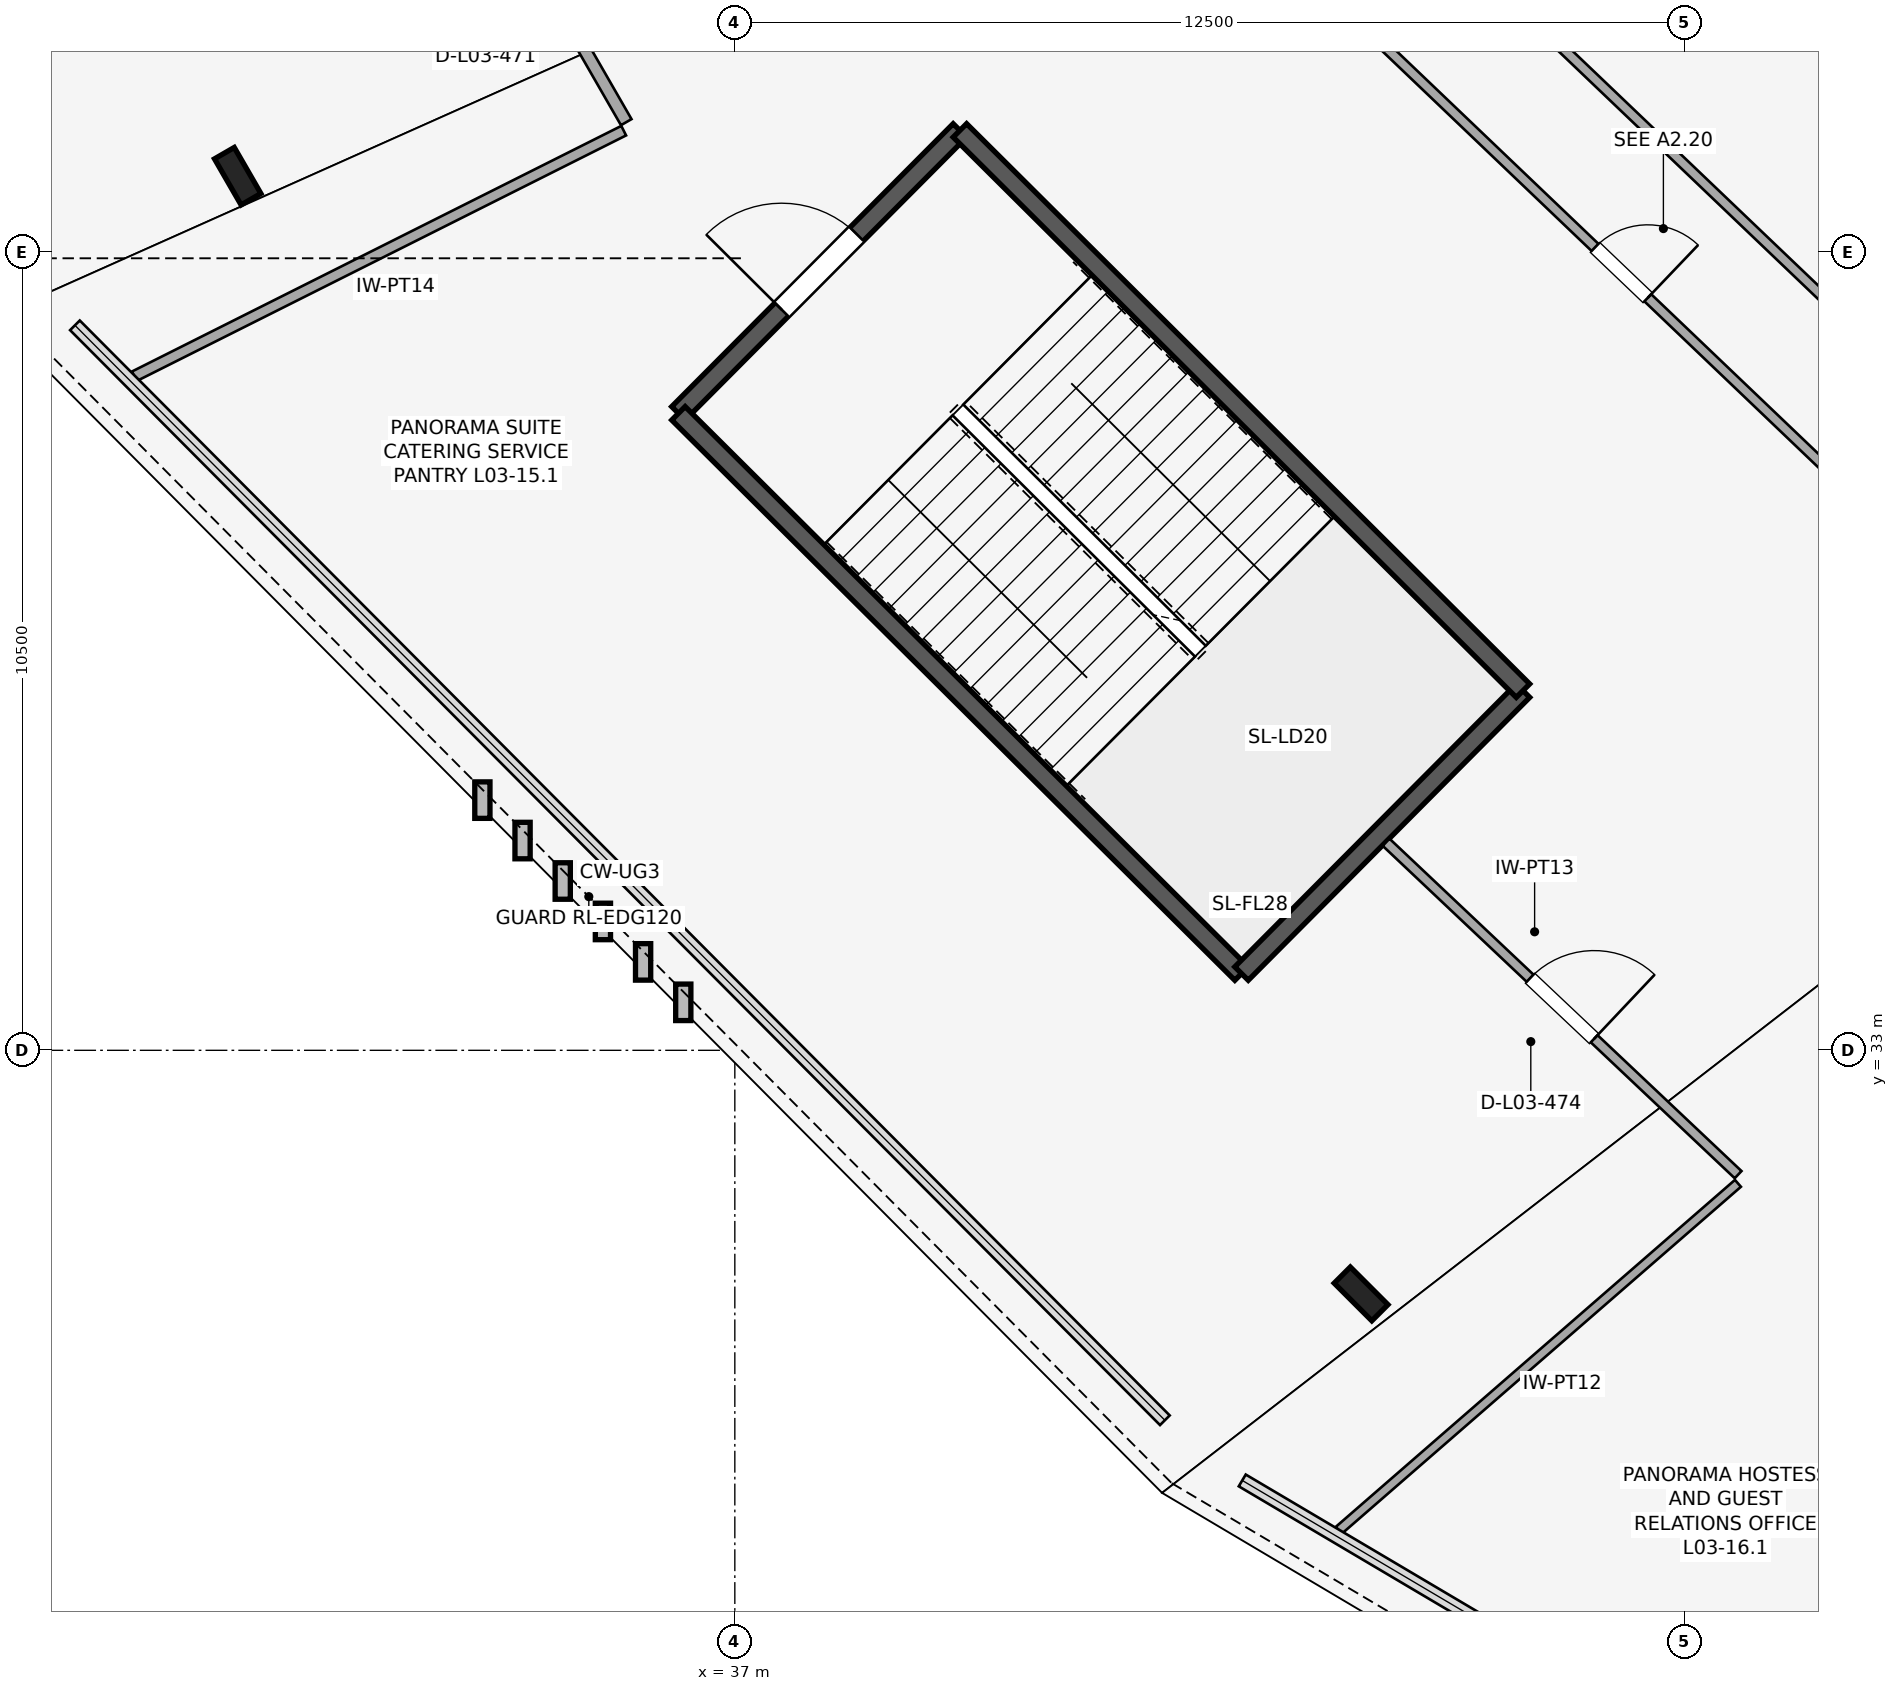
"""IFC4 building model, lengths in metres.
Left out: names, types, materials, properties, quantities, classifications, styles, units other than length and angle.
Written with IfcOpenShell. Run it as: python <this file> out.ifc"""

import sys

from ifc_helpers import new_model, si_unit, direction, frame, frame_2d, origin, origin_2d, place, context, subcontext, project, spatial, rectangle, i_section, extrude, element, fill, save


model = new_model("IFC4")
c1 = context("Model", 3, precision=1e-05, world=origin(), true_north=direction((0.0, 1.0)))
c2 = subcontext(c1, "Body", "Model", "MODEL_VIEW")
j1 = project(units=[si_unit("LENGTHUNIT", "METRE"), si_unit("PLANEANGLEUNIT", "RADIAN")], contexts=[c1])
p1 = place(None, origin())
s1 = spatial("IfcSite", under=j1, at=p1, CompositionType="ELEMENT")
p2 = place(p1, origin())
s2 = spatial("IfcBuilding", under=s1, at=p2, CompositionType="ELEMENT")
p3 = place(p2, frame((0.0, 0.0, 15.6)))
s3 = spatial("IfcBuildingStorey", under=s2, at=p3, CompositionType="ELEMENT", Elevation=15.6)
for number, where, z_axis, x_axis in (
    (1, (30.46, 44.5, 0.0), (0.0, 0.0, 1.0), (-0.866, -0.5, 0.0)),
    (2, (45.239, 29.795, 0.0), (0.0, 0.0, 1.0), (-0.707, -0.707, 0.0)),
):
    element("IfcColumn", number, at=place(p3, frame(where, z_axis=z_axis, x_axis=x_axis)), inside=s3, PredefinedType="COLUMN", context=c2, shape_type="SweptSolid", body=[
        extrude(i_section(OverallWidth=0.3, OverallDepth=0.7, WebThickness=0.017, FlangeThickness=0.032, FilletRadius=0.027, at=origin_2d()), origin(), (0.0, 0.0, 1.0), 5.2),
    ])
p4 = place(p3, frame((39.961, 45.102, 0.0), z_axis=(0.0, 0.0, 1.0), x_axis=(-0.705314141126, -0.708894888067, 0.0)))
e3 = element("IfcWall", 3, at=p4, inside=s3, PredefinedType="SHEAR", context=c2, shape_type="SweptSolid", body=[
    extrude(rectangle(XDim=5.25, YDim=0.25, at=frame_2d((2.625, 0.0))), origin(), (0.0, 0.0, 1.0), 4.9),
])
p5 = place(p4, frame((1.925, 0.0, 0.0)))
e4 = element("IfcOpeningElement", 4, at=p5, cuts=e3, PredefinedType="OPENING", context=c2, shape_type="SweptSolid", body=[
    extrude(rectangle(XDim=1.4, YDim=2.2, at=frame_2d((0.7, 1.1))), frame((0.0, 0.135, 0.0), z_axis=(0.0, -1.0, 0.0), x_axis=(1.0, 0.0, 0.0)), (0.0, 0.0, 1.0), 0.27),
])
p6 = place(p3, frame((36.258, 41.38, 0.0), z_axis=(0.0, 0.0, 1.0), x_axis=(0.708891762409, -0.705317282639, 0.0)))
e5 = element("IfcWall", 5, at=p6, inside=s3, PredefinedType="SHEAR", context=c2, shape_type="SweptSolid", body=[
    extrude(rectangle(XDim=10.45, YDim=0.25, at=frame_2d((5.225, 0.0))), origin(), (0.0, 0.0, 1.0), 4.9),
])
p7 = place(p3, frame((43.666, 34.01, 0.0), z_axis=(0.0, 0.0, 1.0), x_axis=(0.705314141126, 0.708894888067, 0.0)))
e6 = element("IfcWall", 6, at=p7, inside=s3, PredefinedType="SHEAR", context=c2, shape_type="SweptSolid", body=[
    extrude(rectangle(XDim=5.25, YDim=0.25, at=frame_2d((2.625, 0.0))), origin(), (0.0, 0.0, 1.0), 4.9),
])
p8 = place(p3, frame((47.369, 37.731, 0.0), z_axis=(0.0, 0.0, 1.0), x_axis=(-0.708891762409, 0.705317282639, 0.0)))
e7 = element("IfcWall", 7, at=p8, inside=s3, PredefinedType="SHEAR", context=c2, shape_type="SweptSolid", body=[
    extrude(rectangle(XDim=10.45, YDim=0.25, at=frame_2d((5.225, 0.0))), origin(), (0.0, 0.0, 1.0), 4.9),
])
p9 = place(p3, frame((45.543, 46.212, 0.0), z_axis=(0.0, 0.0, 1.0), x_axis=(0.723282965578, -0.69055177337, 0.0)))
e8 = element("IfcWall", 8, at=p9, inside=s3, PredefinedType="PARTITIONING", context=c2, shape_type="SweptSolid", body=[
    extrude(rectangle(XDim=8.63, YDim=0.13, at=frame_2d((4.315, 0.0))), origin(), (0.0, 0.0, 1.0), 2.45),
])
p10 = place(p9, frame((3.835, 0.0, 0.0)))
e9 = element("IfcOpeningElement", 9, at=p10, cuts=e8, PredefinedType="OPENING", context=c2, shape_type="SweptSolid", body=[
    extrude(rectangle(XDim=0.96, YDim=2.24, at=frame_2d((0.48, 1.12))), frame((0.0, 0.075, 0.0), z_axis=(0.0, -1.0, 0.0), x_axis=(1.0, 0.0, 0.0)), (0.0, 0.0, 1.0), 0.15),
])
p11 = place(p3, frame((46.648, 47.369, 0.0), z_axis=(0.0, 0.0, 1.0), x_axis=(0.723310584954, -0.690522843716, 0.0)))
e10 = element("IfcWall", 10, at=p11, inside=s3, PredefinedType="PARTITIONING", context=c2, shape_type="SweptSolid", body=[
    extrude(rectangle(XDim=8.63, YDim=0.13, at=frame_2d((4.315, 0.0))), origin(), (0.0, 0.0, 1.0), 2.45),
])
p12 = place(p3, frame((32.912, 49.83, 0.0), z_axis=(0.0, 0.0, 1.0), x_axis=(0.498938381592, -0.86663746248, 0.0)))
e11 = element("IfcWall", 11, at=p12, inside=s3, PredefinedType="PARTITIONING", context=c2, shape_type="SweptSolid", body=[
    extrude(rectangle(XDim=5.33, YDim=0.16, at=frame_2d((2.665, 0.0))), origin(), (0.0, 0.0, 1.0), 2.45),
])
p13 = place(p12, frame((2.215, 0.0, 0.0)))
e12 = element("IfcOpeningElement", 12, at=p13, cuts=e11, PredefinedType="OPENING", context=c2, shape_type="SweptSolid", body=[
    extrude(rectangle(XDim=0.9, YDim=2.24, at=frame_2d((0.45, 1.12))), frame((0.0, 0.09, 0.0), z_axis=(0.0, -1.0, 0.0), x_axis=(1.0, 0.0, 0.0)), (0.0, 0.0, 1.0), 0.18),
])
p14 = place(p3, frame((35.538, 45.099, 0.0), z_axis=(0.0, 0.0, 1.0), x_axis=(-0.893748311222, -0.448568786463, 0.0)))
e13 = element("IfcWall", 13, at=p14, inside=s3, PredefinedType="PARTITIONING", context=c2, shape_type="SweptSolid", body=[
    extrude(rectangle(XDim=7.203, YDim=0.14, at=frame_2d((3.602, 0.0))), origin(), (0.0, 0.0, 1.0), 2.45),
])
p15 = place(p3, frame((45.568, 35.737, 0.0), z_axis=(0.0, 0.0, 1.0), x_axis=(0.727092872765, -0.686539113506, 0.0)))
e14 = element("IfcWall", 14, at=p15, inside=s3, PredefinedType="PARTITIONING", context=c2, shape_type="SweptSolid", body=[
    extrude(rectangle(XDim=6.369, YDim=0.13, at=frame_2d((3.185, 0.0))), origin(), (0.0, 0.0, 1.0), 2.45),
])
p16 = place(p15, frame((2.605, 0.0, 0.0)))
e15 = element("IfcOpeningElement", 15, at=p16, cuts=e14, PredefinedType="OPENING", context=c2, shape_type="SweptSolid", body=[
    extrude(rectangle(XDim=1.16, YDim=2.1, at=frame_2d((0.58, 1.05))), frame((0.0, 0.075, 0.0), z_axis=(0.0, -1.0, 0.0), x_axis=(1.0, 0.0, 0.0)), (0.0, 0.0, 1.0), 0.15),
])
p17 = place(p3, frame((50.197, 31.25, 0.0), z_axis=(0.0, 0.0, 1.0), x_axis=(-0.7547437232, -0.656019749924, 0.0)))
e16 = element("IfcWall", 16, at=p17, inside=s3, PredefinedType="PARTITIONING", context=c2, shape_type="SweptSolid", body=[
    extrude(rectangle(XDim=6.959, YDim=0.12, at=frame_2d((3.479, 0.0))), origin(), (0.0, 0.0, 1.0), 2.45),
])
p18 = place(p5, frame((1.4, 0.0, 0.0), z_axis=(0.0, 0.0, 1.0), x_axis=(-1.0, 0.0, 0.0)))
e17 = element("IfcDoor", 17, at=p18, inside=s3, OperationType="SINGLE_SWING_LEFT", PredefinedType="DOOR", context=c2, shape_type="SweptSolid", body=[
    extrude(rectangle(XDim=1.4, YDim=2.2, at=frame_2d((0.7, 1.1))), frame((0.0, 0.025, 0.0), z_axis=(0.0, -1.0, 0.0), x_axis=(1.0, 0.0, 0.0)), (0.0, 0.0, 1.0), 0.05),
])
fill(e4, e17)
p19 = place(p10, origin())
e18 = element("IfcDoor", 18, at=p19, inside=s3, OperationType="SINGLE_SWING_RIGHT", PredefinedType="DOOR", context=c2, shape_type="SweptSolid", body=[
    extrude(rectangle(XDim=0.96, YDim=2.24, at=frame_2d((0.48, 1.12))), frame((0.0, 0.025, 0.0), z_axis=(0.0, -1.0, 0.0), x_axis=(1.0, 0.0, 0.0)), (0.0, 0.0, 1.0), 0.05),
])
fill(e9, e18)
p20 = place(p16, origin())
e19 = element("IfcDoor", 19, at=p20, inside=s3, OperationType="SINGLE_SWING_RIGHT", PredefinedType="DOOR", context=c2, shape_type="SweptSolid", body=[
    extrude(rectangle(XDim=1.16, YDim=2.1, at=frame_2d((0.58, 1.05))), frame((0.0, 0.025, 0.0), z_axis=(0.0, -1.0, 0.0), x_axis=(1.0, 0.0, 0.0)), (0.0, 0.0, 1.0), 0.05),
])
fill(e15, e19)
save(model, sys.argv[1])
